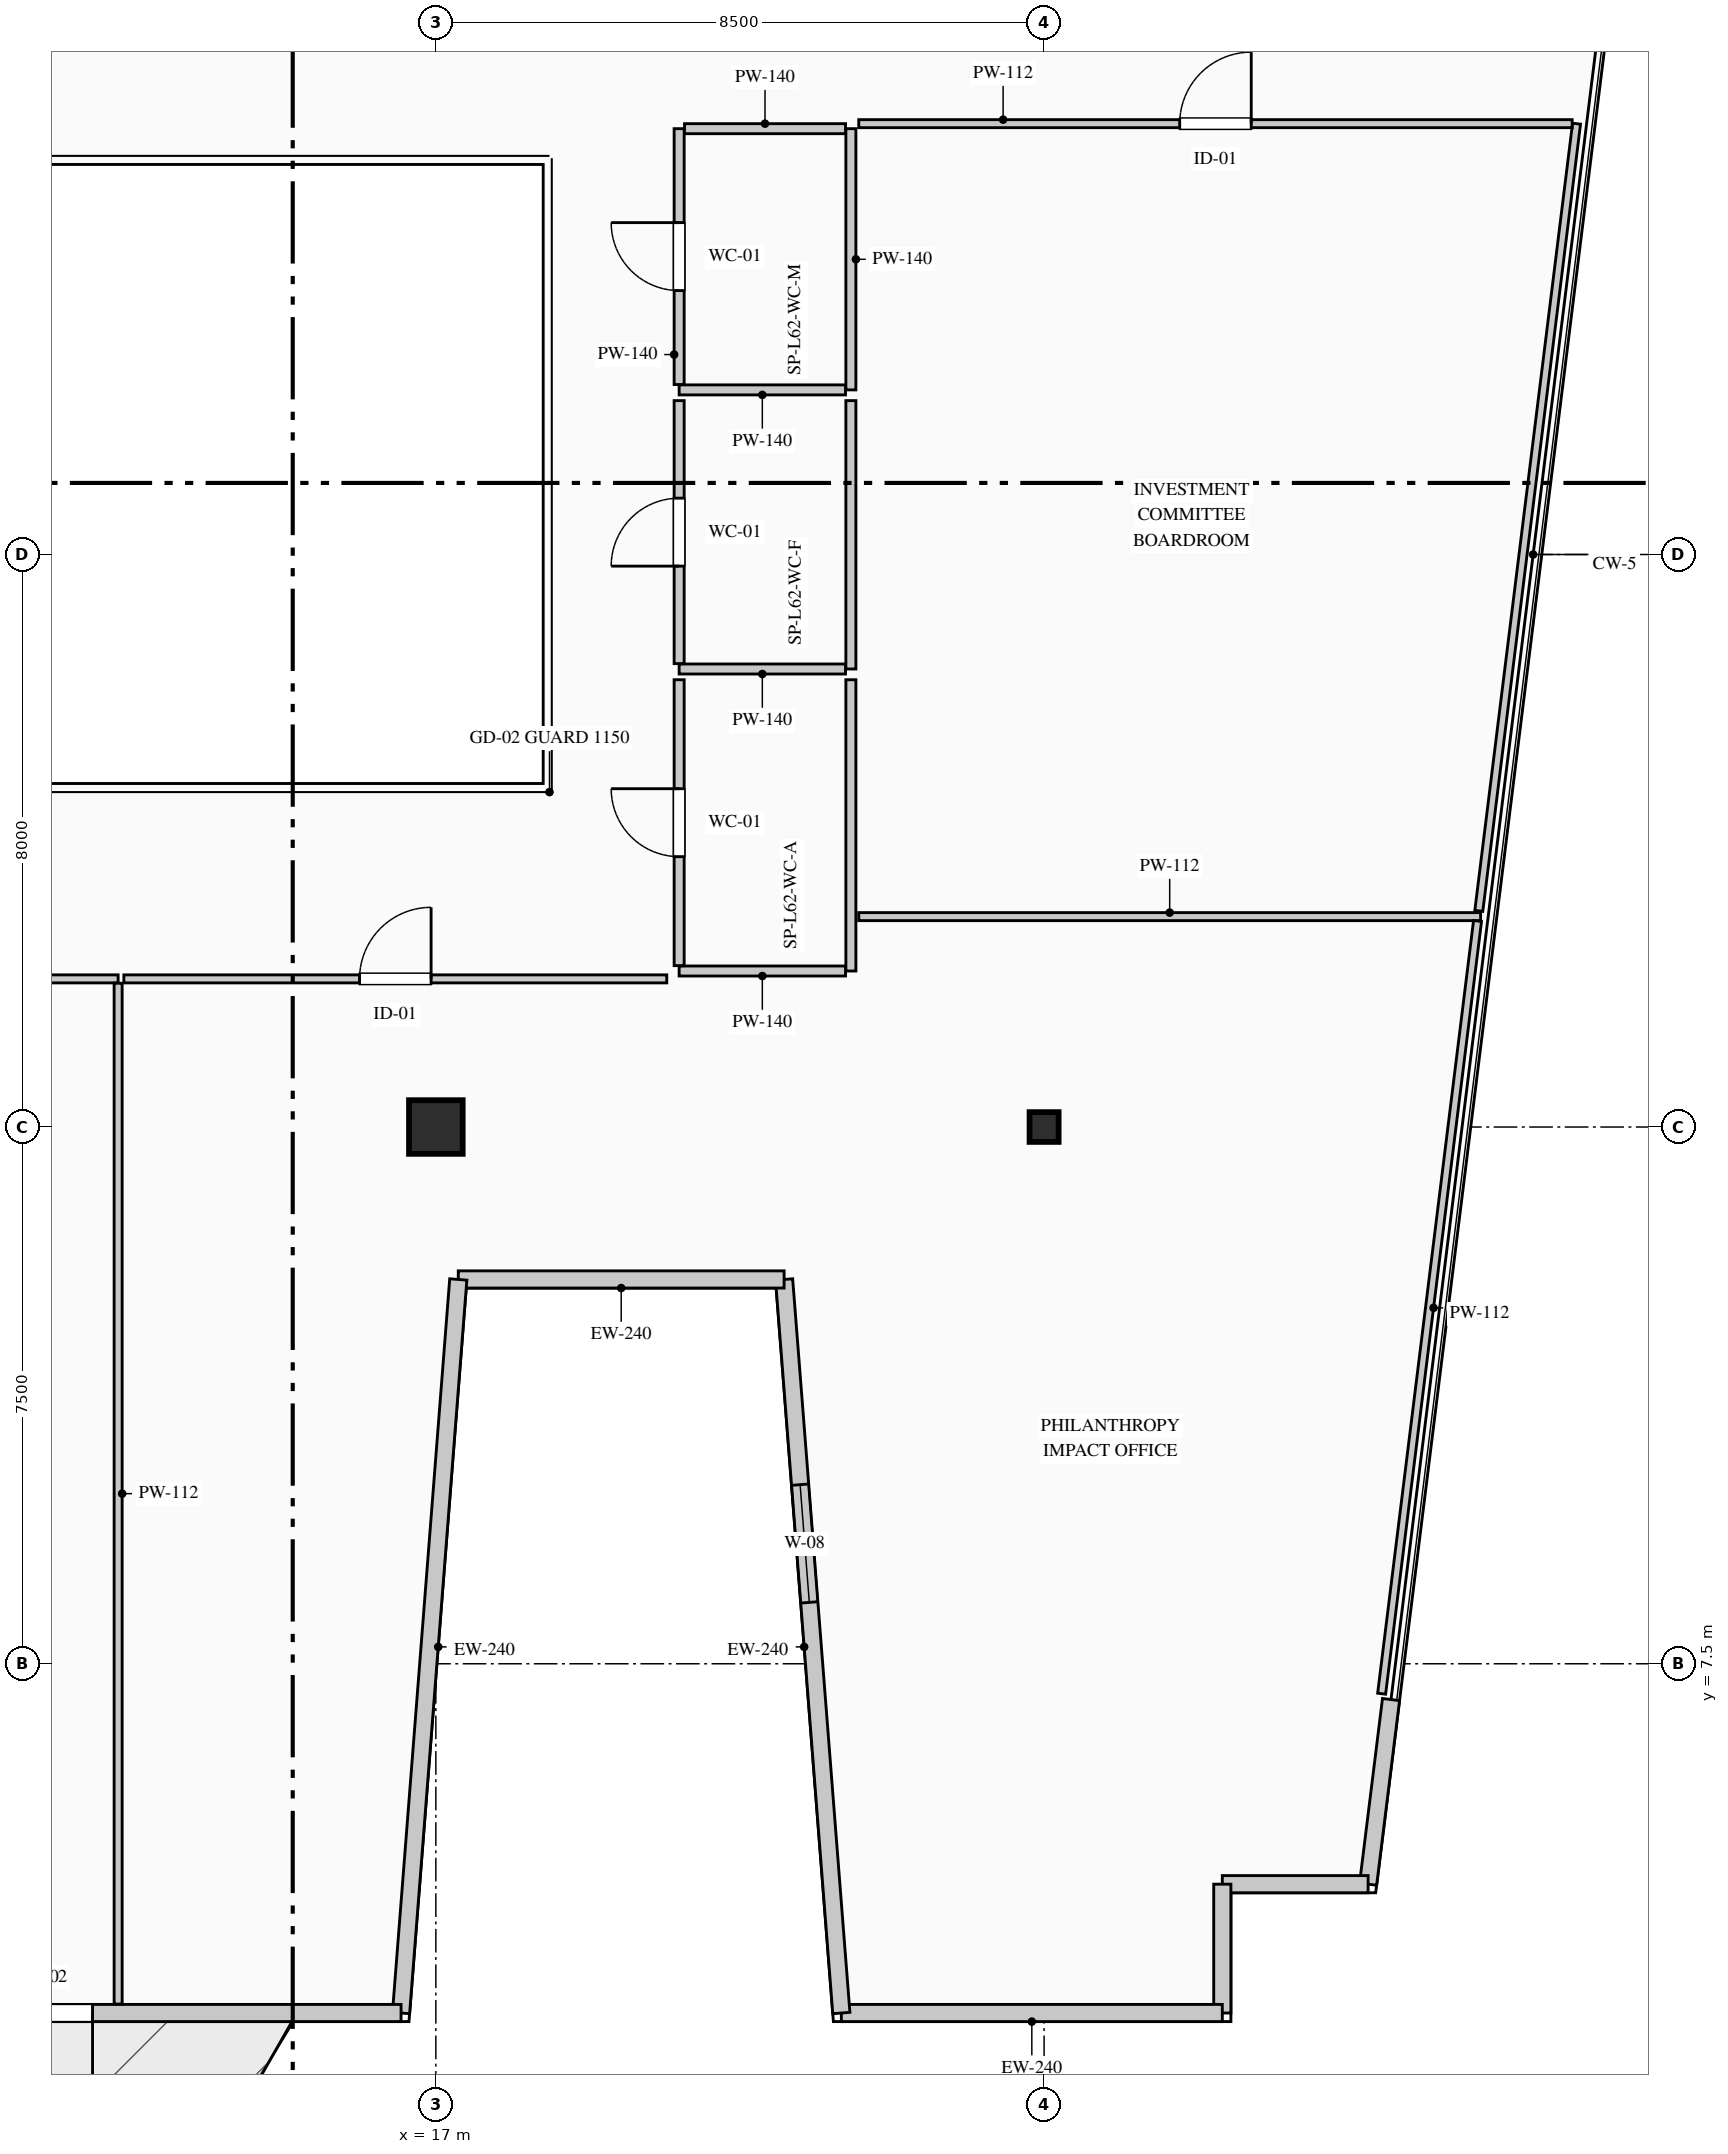
"""IFC4 building model, lengths in metres.
Left out: names, types, materials, properties, quantities, classifications, styles, units other than length and angle.
Written with IfcOpenShell. Run it as: python <this file> out.ifc"""

import sys

from ifc_helpers import new_model, si_unit, direction, frame, frame_2d, origin, origin_2d, place, context, subcontext, project, spatial, rectangle, i_section, extrude, element, fill, save


model = new_model("IFC4")
c1 = context("Model", 3, precision=1e-05, world=origin(), true_north=direction((0.0, 1.0)))
c2 = subcontext(c1, "Body", "Model", "MODEL_VIEW")
j1 = project(units=[si_unit("LENGTHUNIT", "METRE"), si_unit("PLANEANGLEUNIT", "RADIAN")], contexts=[c1])
p1 = place(None, origin())
s1 = spatial("IfcSite", under=j1, at=p1, CompositionType="ELEMENT")
p2 = place(p1, origin())
s2 = spatial("IfcBuilding", under=s1, at=p2, CompositionType="ELEMENT")
p3 = place(p2, frame((0.0, 0.0, 260.65)))
s3 = spatial("IfcBuildingStorey", under=s2, at=p3, CompositionType="ELEMENT", Elevation=260.65)
p4 = place(p3, frame((17.0, 15.0, 0.0), z_axis=(0.0, 0.0, 1.0), x_axis=(1.0, 0.0, 0.0)))
e1 = element("IfcColumn", 1, at=p4, inside=s3, PredefinedType="COLUMN", context=c2, shape_type="SweptSolid", body=[
    extrude(rectangle(XDim=0.75, YDim=0.75, at=origin_2d()), origin(), (0.0, 0.0, 1.0), 3.95),
])
p5 = place(p3, frame((25.5, 15.0, 0.0), z_axis=(0.0, 0.0, 1.0), x_axis=(1.0, 0.0, 0.0)))
e2 = element("IfcColumn", 2, at=p5, inside=s3, PredefinedType="COLUMN", context=c2, shape_type="SweptSolid", body=[
    extrude(i_section(OverallWidth=0.406, OverallDepth=0.416, WebThickness=0.03, FlangeThickness=0.048, FilletRadius=0.015, at=origin_2d()), origin(), (0.0, 0.0, 1.0), 3.95),
])
p6 = place(p3, frame((30.348, 7.0, 0.0), z_axis=(0.0, 0.0, 1.0), x_axis=(-0.123191073593, -0.992382970121, 0.0)))
e3 = element("IfcWall", 3, at=p6, inside=s3, PredefinedType="STANDARD", context=c2, shape_type="SweptSolid", body=[
    extrude(rectangle(XDim=2.6, YDim=0.24, at=frame_2d((1.3, 0.0))), origin(), (0.0, 0.0, 1.0), 3.7),
])
p7 = place(p3, frame((30.028, 4.42, 0.0), z_axis=(0.0, 0.0, 1.0), x_axis=(-1.0, 0.0, 0.0)))
e4 = element("IfcWall", 4, at=p7, inside=s3, PredefinedType="STANDARD", context=c2, shape_type="SweptSolid", body=[
    extrude(rectangle(XDim=2.037, YDim=0.24, at=frame_2d((1.019, 0.0))), origin(), (0.0, 0.0, 1.0), 3.7),
])
p8 = place(p3, frame((27.99, 4.42, 0.0), z_axis=(0.0, 0.0, 1.0), x_axis=(0.0, -1.0, 0.0)))
e5 = element("IfcWall", 5, at=p8, inside=s3, PredefinedType="STANDARD", context=c2, shape_type="SweptSolid", body=[
    extrude(rectangle(XDim=1.8, YDim=0.24, at=frame_2d((0.9, 0.0))), origin(), (0.0, 0.0, 1.0), 3.7),
])
p9 = place(p3, frame((27.99, 2.62, 0.0), z_axis=(0.0, 0.0, 1.0), x_axis=(-1.0, 0.0, 0.0)))
e6 = element("IfcWall", 6, at=p9, inside=s3, PredefinedType="STANDARD", context=c2, shape_type="SweptSolid", body=[
    extrude(rectangle(XDim=5.324, YDim=0.24, at=frame_2d((2.662, 0.0))), origin(), (0.0, 0.0, 1.0), 3.7),
])
p10 = place(p3, frame((22.667, 2.62, 0.0), z_axis=(0.0, 0.0, 1.0), x_axis=(-0.077816860153, 0.996967670627, 0.0)))
e7 = element("IfcWall", 7, at=p10, inside=s3, PredefinedType="STANDARD", context=c2, shape_type="SweptSolid", body=[
    extrude(rectangle(XDim=10.281, YDim=0.24, at=frame_2d((5.141, 0.0))), origin(), (0.0, 0.0, 1.0), 3.7),
])
p11 = place(p10, frame((5.755, 0.0, 0.9)))
e8 = element("IfcOpeningElement", 8, at=p11, cuts=e7, PredefinedType="OPENING", context=c2, shape_type="SweptSolid", body=[
    extrude(rectangle(XDim=1.65, YDim=1.95, at=frame_2d((0.825, 0.975))), frame((0.0, 0.13, 0.0), z_axis=(0.0, -1.0, 0.0), x_axis=(1.0, 0.0, 0.0)), (0.0, 0.0, 1.0), 0.26),
])
p12 = place(p3, frame((21.867, 12.87, 0.0), z_axis=(0.0, 0.0, 1.0), x_axis=(-1.0, 0.0, 0.0)))
e9 = element("IfcWall", 9, at=p12, inside=s3, PredefinedType="STANDARD", context=c2, shape_type="SweptSolid", body=[
    extrude(rectangle(XDim=4.553, YDim=0.24, at=frame_2d((2.277, 0.0))), origin(), (0.0, 0.0, 1.0), 3.7),
])
p13 = place(p3, frame((17.313, 12.87, 0.0), z_axis=(0.0, 0.0, 1.0), x_axis=(-0.077816860153, -0.996967670627, 0.0)))
e10 = element("IfcWall", 10, at=p13, inside=s3, PredefinedType="STANDARD", context=c2, shape_type="SweptSolid", body=[
    extrude(rectangle(XDim=10.281, YDim=0.24, at=frame_2d((5.141, 0.0))), origin(), (0.0, 0.0, 1.0), 3.7),
])
p14 = place(p3, frame((16.513, 2.62, 0.0), z_axis=(0.0, 0.0, 1.0), x_axis=(-1.0, 0.0, 0.0)))
e11 = element("IfcWall", 11, at=p14, inside=s3, PredefinedType="STANDARD", context=c2, shape_type="SweptSolid", body=[
    extrude(rectangle(XDim=8.408, YDim=0.24, at=frame_2d((4.204, 0.0))), origin(), (0.0, 0.0, 1.0), 3.7),
])
p15 = place(p14, frame((4.311, 0.0, 0.0)))
e12 = element("IfcOpeningElement", 12, at=p15, cuts=e11, PredefinedType="OPENING", context=c2, shape_type="SweptSolid", body=[
    extrude(rectangle(XDim=1.4, YDim=2.2, at=frame_2d((0.7, 1.1))), frame((0.0, 0.13, 0.0), z_axis=(0.0, -1.0, 0.0), x_axis=(1.0, 0.0, 0.0)), (0.0, 0.0, 1.0), 0.26),
])
p16 = place(p3, frame((22.8, 28.95, 0.0), z_axis=(0.0, 0.0, 1.0), x_axis=(0.0, -1.0, 0.0)))
e13 = element("IfcWall", 13, at=p16, inside=s3, PredefinedType="PARTITIONING", context=c2, shape_type="SweptSolid", body=[
    extrude(rectangle(XDim=3.65, YDim=0.14, at=frame_2d((1.825, 0.0))), origin(), (0.0, 0.0, 1.0), 3.385),
])
p17 = place(p3, frame((22.725, 25.3, 0.0), z_axis=(0.0, 0.0, 1.0), x_axis=(-1.0, 0.0, 0.0)))
e14 = element("IfcWall", 14, at=p17, inside=s3, PredefinedType="PARTITIONING", context=c2, shape_type="SweptSolid", body=[
    extrude(rectangle(XDim=2.325, YDim=0.14, at=frame_2d((1.163, 0.0))), origin(), (0.0, 0.0, 1.0), 3.7),
])
p18 = place(p3, frame((20.4, 25.375, 0.0), z_axis=(0.0, 0.0, 1.0), x_axis=(0.0, 1.0, 0.0)))
e15 = element("IfcWall", 15, at=p18, inside=s3, PredefinedType="PARTITIONING", context=c2, shape_type="SweptSolid", body=[
    extrude(rectangle(XDim=3.575, YDim=0.14, at=frame_2d((1.788, 0.0))), origin(), (0.0, 0.0, 1.0), 3.7),
])
p19 = place(p18, frame((1.312, 0.0, 0.0)))
e16 = element("IfcOpeningElement", 16, at=p19, cuts=e15, PredefinedType="OPENING", context=c2, shape_type="SweptSolid", body=[
    extrude(rectangle(XDim=0.95, YDim=2.15, at=frame_2d((0.475, 1.075))), frame((0.0, 0.08, 0.0), z_axis=(0.0, -1.0, 0.0), x_axis=(1.0, 0.0, 0.0)), (0.0, 0.0, 1.0), 0.16),
])
p20 = place(p3, frame((20.475, 28.95, 0.0), z_axis=(0.0, 0.0, 1.0), x_axis=(1.0, 0.0, 0.0)))
e17 = element("IfcWall", 17, at=p20, inside=s3, PredefinedType="PARTITIONING", context=c2, shape_type="SweptSolid", body=[
    extrude(rectangle(XDim=2.25, YDim=0.14, at=frame_2d((1.125, 0.0))), origin(), (0.0, 0.0, 1.0), 3.7),
])
p21 = place(p3, frame((22.8, 25.15, 0.0), z_axis=(0.0, 0.0, 1.0), x_axis=(0.0, -1.0, 0.0)))
e18 = element("IfcWall", 18, at=p21, inside=s3, PredefinedType="PARTITIONING", context=c2, shape_type="SweptSolid", body=[
    extrude(rectangle(XDim=3.75, YDim=0.14, at=frame_2d((1.875, 0.0))), origin(), (0.0, 0.0, 1.0), 3.385),
])
p22 = place(p3, frame((22.725, 21.4, 0.0), z_axis=(0.0, 0.0, 1.0), x_axis=(-1.0, 0.0, 0.0)))
e19 = element("IfcWall", 19, at=p22, inside=s3, PredefinedType="PARTITIONING", context=c2, shape_type="SweptSolid", body=[
    extrude(rectangle(XDim=2.325, YDim=0.14, at=frame_2d((1.163, 0.0))), origin(), (0.0, 0.0, 1.0), 3.7),
])
p23 = place(p3, frame((20.4, 21.475, 0.0), z_axis=(0.0, 0.0, 1.0), x_axis=(0.0, 1.0, 0.0)))
e20 = element("IfcWall", 20, at=p23, inside=s3, PredefinedType="PARTITIONING", context=c2, shape_type="SweptSolid", body=[
    extrude(rectangle(XDim=3.675, YDim=0.14, at=frame_2d((1.837, 0.0))), origin(), (0.0, 0.0, 1.0), 3.7),
])
p24 = place(p23, frame((1.363, 0.0, 0.0)))
e21 = element("IfcOpeningElement", 21, at=p24, cuts=e20, PredefinedType="OPENING", context=c2, shape_type="SweptSolid", body=[
    extrude(rectangle(XDim=0.95, YDim=2.15, at=frame_2d((0.475, 1.075))), frame((0.0, 0.08, 0.0), z_axis=(0.0, -1.0, 0.0), x_axis=(1.0, 0.0, 0.0)), (0.0, 0.0, 1.0), 0.16),
])
p25 = place(p3, frame((22.8, 21.25, 0.0), z_axis=(0.0, 0.0, 1.0), x_axis=(0.0, -1.0, 0.0)))
e22 = element("IfcWall", 22, at=p25, inside=s3, PredefinedType="PARTITIONING", context=c2, shape_type="SweptSolid", body=[
    extrude(rectangle(XDim=4.07, YDim=0.14, at=frame_2d((2.035, 0.0))), origin(), (0.0, 0.0, 1.0), 3.385),
])
p26 = place(p3, frame((22.725, 17.18, 0.0), z_axis=(0.0, 0.0, 1.0), x_axis=(-1.0, 0.0, 0.0)))
e23 = element("IfcWall", 23, at=p26, inside=s3, PredefinedType="PARTITIONING", context=c2, shape_type="SweptSolid", body=[
    extrude(rectangle(XDim=2.325, YDim=0.14, at=frame_2d((1.163, 0.0))), origin(), (0.0, 0.0, 1.0), 3.7),
])
p27 = place(p3, frame((20.4, 17.255, 0.0), z_axis=(0.0, 0.0, 1.0), x_axis=(0.0, 1.0, 0.0)))
e24 = element("IfcWall", 24, at=p27, inside=s3, PredefinedType="PARTITIONING", context=c2, shape_type="SweptSolid", body=[
    extrude(rectangle(XDim=3.995, YDim=0.14, at=frame_2d((1.998, 0.0))), origin(), (0.0, 0.0, 1.0), 3.7),
])
p28 = place(p27, frame((1.522, 0.0, 0.0)))
e25 = element("IfcOpeningElement", 25, at=p28, cuts=e24, PredefinedType="OPENING", context=c2, shape_type="SweptSolid", body=[
    extrude(rectangle(XDim=0.95, YDim=2.15, at=frame_2d((0.475, 1.075))), frame((0.0, 0.08, 0.0), z_axis=(0.0, -1.0, 0.0), x_axis=(1.0, 0.0, 0.0)), (0.0, 0.0, 1.0), 0.16),
])
p29 = place(p3, frame((5.122, 17.07, 0.0), z_axis=(0.0, 0.0, 1.0), x_axis=(1.0, 0.0, 0.0)))
e26 = element("IfcWall", 26, at=p29, inside=s3, PredefinedType="PARTITIONING", context=c2, shape_type="SweptSolid", body=[
    extrude(rectangle(XDim=7.438, YDim=0.112, at=frame_2d((3.719, 0.0))), origin(), (0.0, 0.0, 1.0), 3.7),
])
p30 = place(p29, frame((3.219, 0.0, 0.0)))
e27 = element("IfcOpeningElement", 27, at=p30, cuts=e26, PredefinedType="OPENING", context=c2, shape_type="SweptSolid", body=[
    extrude(rectangle(XDim=1.0, YDim=2.15, at=frame_2d((0.5, 1.075))), frame((0.0, 0.066, 0.0), z_axis=(0.0, -1.0, 0.0), x_axis=(1.0, 0.0, 0.0)), (0.0, 0.0, 1.0), 0.132),
])
p31 = place(p3, frame((12.56, 17.009, 0.0), z_axis=(0.0, 0.0, 1.0), x_axis=(0.0, -1.0, 0.0)))
e28 = element("IfcWall", 28, at=p31, inside=s3, PredefinedType="PARTITIONING", context=c2, shape_type="SweptSolid", body=[
    extrude(rectangle(XDim=14.264, YDim=0.112, at=frame_2d((7.132, 0.0))), origin(), (0.0, 0.0, 1.0), 3.7),
])
p32 = place(p3, frame((22.91, 17.94, 0.0), z_axis=(0.0, 0.0, 1.0), x_axis=(1.0, 0.0, 0.0)))
e29 = element("IfcWall", 29, at=p32, inside=s3, PredefinedType="PARTITIONING", context=c2, shape_type="SweptSolid", body=[
    extrude(rectangle(XDim=8.69, YDim=0.112, at=frame_2d((4.345, 0.0))), origin(), (0.0, 0.0, 1.0), 3.7),
])
p33 = place(p3, frame((31.557, 17.879, 0.0), z_axis=(0.0, 0.0, 1.0), x_axis=(-0.12319234905, -0.99238281179, 0.0)))
e30 = element("IfcWall", 30, at=p33, inside=s3, PredefinedType="PARTITIONING", context=c2, shape_type="SweptSolid", body=[
    extrude(rectangle(XDim=10.88, YDim=0.112, at=frame_2d((5.44, 0.0))), origin(), (0.0, 0.0, 1.0), 3.7),
])
p34 = place(p3, frame((12.64, 17.07, 0.0), z_axis=(0.0, 0.0, 1.0), x_axis=(1.0, 0.0, 0.0)))
e31 = element("IfcWall", 31, at=p34, inside=s3, PredefinedType="PARTITIONING", context=c2, shape_type="SweptSolid", body=[
    extrude(rectangle(XDim=7.587, YDim=0.112, at=frame_2d((3.793, 0.0))), origin(), (0.0, 0.0, 1.0), 3.7),
])
p35 = place(p34, frame((3.293, 0.0, 0.0)))
e32 = element("IfcOpeningElement", 32, at=p35, cuts=e31, PredefinedType="OPENING", context=c2, shape_type="SweptSolid", body=[
    extrude(rectangle(XDim=1.0, YDim=2.15, at=frame_2d((0.5, 1.075))), frame((0.0, 0.066, 0.0), z_axis=(0.0, -1.0, 0.0), x_axis=(1.0, 0.0, 0.0)), (0.0, 0.0, 1.0), 0.132),
])
p36 = place(p3, frame((32.941, 29.02, 0.0), z_axis=(0.0, 0.0, 1.0), x_axis=(-0.123232290614, -0.99237785271, 0.0)))
e33 = element("IfcWall", 33, at=p36, inside=s3, PredefinedType="PARTITIONING", context=c2, shape_type="SweptSolid", body=[
    extrude(rectangle(XDim=11.084, YDim=0.112, at=frame_2d((5.542, 0.0))), origin(), (0.0, 0.0, 1.0), 3.7),
])
p37 = place(p3, frame((22.91, 29.02, 0.0), z_axis=(0.0, 0.0, 1.0), x_axis=(1.0, 0.0, 0.0)))
e34 = element("IfcWall", 34, at=p37, inside=s3, PredefinedType="PARTITIONING", context=c2, shape_type="SweptSolid", body=[
    extrude(rectangle(XDim=9.969, YDim=0.112, at=frame_2d((4.985, 0.0))), origin(), (0.0, 0.0, 1.0), 3.7),
])
p38 = place(p37, frame((4.485, 0.0, 0.0)))
e35 = element("IfcOpeningElement", 35, at=p38, cuts=e34, PredefinedType="OPENING", context=c2, shape_type="SweptSolid", body=[
    extrude(rectangle(XDim=1.0, YDim=2.15, at=frame_2d((0.5, 1.075))), frame((0.0, 0.066, 0.0), z_axis=(0.0, -1.0, 0.0), x_axis=(1.0, 0.0, 0.0)), (0.0, 0.0, 1.0), 0.132),
])
p39 = place(p11, origin())
e36 = element("IfcWindow", 36, at=p39, inside=s3, PartitioningType="SINGLE_PANEL", PredefinedType="WINDOW", context=c2, shape_type="SweptSolid", body=[
    extrude(rectangle(XDim=1.65, YDim=1.95, at=frame_2d((0.825, 0.975))), frame((0.0, 0.03, 0.0), z_axis=(0.0, -1.0, 0.0), x_axis=(1.0, 0.0, 0.0)), (0.0, 0.0, 1.0), 0.06),
])
fill(e8, e36)
p40 = place(p15, origin())
e37 = element("IfcDoor", 37, at=p40, inside=s3, OperationType="SINGLE_SWING_LEFT", PredefinedType="DOOR", context=c2, shape_type="SweptSolid", body=[
    extrude(rectangle(XDim=1.4, YDim=2.2, at=frame_2d((0.7, 1.1))), frame((0.0, 0.025, 0.0), z_axis=(0.0, -1.0, 0.0), x_axis=(1.0, 0.0, 0.0)), (0.0, 0.0, 1.0), 0.05),
])
fill(e12, e37)
p41 = place(p19, origin())
e38 = element("IfcDoor", 38, at=p41, inside=s3, OperationType="SINGLE_SWING_RIGHT", PredefinedType="DOOR", context=c2, shape_type="SweptSolid", body=[
    extrude(rectangle(XDim=0.95, YDim=2.15, at=frame_2d((0.475, 1.075))), frame((0.0, 0.025, 0.0), z_axis=(0.0, -1.0, 0.0), x_axis=(1.0, 0.0, 0.0)), (0.0, 0.0, 1.0), 0.05),
])
fill(e16, e38)
p42 = place(p24, origin())
e39 = element("IfcDoor", 39, at=p42, inside=s3, OperationType="SINGLE_SWING_LEFT", PredefinedType="DOOR", context=c2, shape_type="SweptSolid", body=[
    extrude(rectangle(XDim=0.95, YDim=2.15, at=frame_2d((0.475, 1.075))), frame((0.0, 0.025, 0.0), z_axis=(0.0, -1.0, 0.0), x_axis=(1.0, 0.0, 0.0)), (0.0, 0.0, 1.0), 0.05),
])
fill(e21, e39)
p43 = place(p28, origin())
e40 = element("IfcDoor", 40, at=p43, inside=s3, OperationType="SINGLE_SWING_RIGHT", PredefinedType="DOOR", context=c2, shape_type="SweptSolid", body=[
    extrude(rectangle(XDim=0.95, YDim=2.15, at=frame_2d((0.475, 1.075))), frame((0.0, 0.025, 0.0), z_axis=(0.0, -1.0, 0.0), x_axis=(1.0, 0.0, 0.0)), (0.0, 0.0, 1.0), 0.05),
])
fill(e25, e40)
p44 = place(p35, origin())
e41 = element("IfcDoor", 41, at=p44, inside=s3, OperationType="SINGLE_SWING_RIGHT", PredefinedType="DOOR", context=c2, shape_type="SweptSolid", body=[
    extrude(rectangle(XDim=1.0, YDim=2.15, at=frame_2d((0.5, 1.075))), frame((0.0, 0.025, 0.0), z_axis=(0.0, -1.0, 0.0), x_axis=(1.0, 0.0, 0.0)), (0.0, 0.0, 1.0), 0.05),
])
fill(e32, e41)
p45 = place(p38, origin())
e42 = element("IfcDoor", 42, at=p45, inside=s3, OperationType="SINGLE_SWING_RIGHT", PredefinedType="DOOR", context=c2, shape_type="SweptSolid", body=[
    extrude(rectangle(XDim=1.0, YDim=2.15, at=frame_2d((0.5, 1.075))), frame((0.0, 0.025, 0.0), z_axis=(0.0, -1.0, 0.0), x_axis=(1.0, 0.0, 0.0)), (0.0, 0.0, 1.0), 0.05),
])
fill(e35, e42)
save(model, sys.argv[1])
